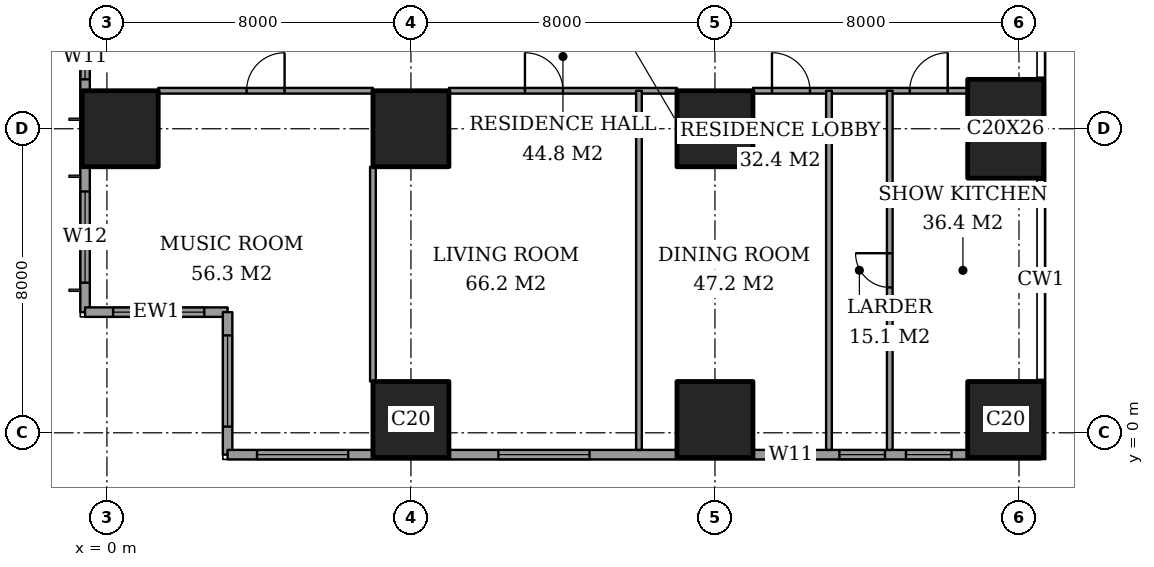
"""IFC4 building model, lengths in metres.
Left out: names, types, materials, properties, quantities, classifications, styles, units other than length and angle.
Written with IfcOpenShell. Run it as: python <this file> out.ifc"""

import sys

from ifc_helpers import new_model, si_unit, direction, frame, frame_2d, origin, origin_2d, place, context, subcontext, project, spatial, rectangle, extrude, element, fill, save


model = new_model("IFC4")
c1 = context("Model", 3, precision=1e-05, world=origin(), true_north=direction((0.0, 1.0)))
c2 = subcontext(c1, "Body", "Model", "MODEL_VIEW")
j1 = project(units=[si_unit("LENGTHUNIT", "METRE"), si_unit("PLANEANGLEUNIT", "RADIAN")], contexts=[c1])
p1 = place(None, origin())
s1 = spatial("IfcSite", under=j1, at=p1, CompositionType="ELEMENT")
p2 = place(p1, origin())
s2 = spatial("IfcBuilding", under=s1, at=p2, CompositionType="ELEMENT")
p3 = place(p2, frame((0.0, 0.0, 99.8)))
s3 = spatial("IfcBuildingStorey", under=s2, at=p3, CompositionType="ELEMENT", Elevation=99.8)
for number, where, z_axis, x_axis in (
    (1, (0.35, 8.0, 0.0), (0.0, 0.0, 1.0), (1.0, 0.0, 0.0)),
    (2, (8.0, 0.35, 0.0), (0.0, 0.0, 1.0), (1.0, 0.0, 0.0)),
    (3, (8.0, 8.0, 0.0), (0.0, 0.0, 1.0), (1.0, 0.0, 0.0)),
    (4, (16.0, 0.35, 0.0), (0.0, 0.0, 1.0), (1.0, 0.0, 0.0)),
    (5, (16.0, 8.0, 0.0), (0.0, 0.0, 1.0), (1.0, 0.0, 0.0)),
    (6, (23.65, 0.35, 0.0), (0.0, 0.0, 1.0), (1.0, 0.0, 0.0)),
):
    element("IfcColumn", number, at=place(p3, frame(where, z_axis=z_axis, x_axis=x_axis)), inside=s3, PredefinedType="COLUMN", context=c2, shape_type="SweptSolid", body=[
        extrude(rectangle(XDim=2.0, YDim=2.0, at=origin_2d()), origin(), (0.0, 0.0, 1.0), 3.6),
    ])
p4 = place(p3, frame((23.65, 8.0, 0.0), z_axis=(0.0, 0.0, 1.0), x_axis=(1.0, 0.0, 0.0)))
e7 = element("IfcColumn", 7, at=p4, inside=s3, PredefinedType="COLUMN", context=c2, shape_type="SweptSolid", body=[
    extrude(rectangle(XDim=2.0, YDim=2.6, at=origin_2d()), origin(), (0.0, 0.0, 1.0), 3.6),
])
p5 = place(p3, frame((-0.575, 44.825, 0.0), z_axis=(0.0, 0.0, 1.0), x_axis=(0.0, -1.0, 0.0)))
e8 = element("IfcWall", 8, at=p5, inside=s3, PredefinedType="SOLIDWALL", context=c2, shape_type="SweptSolid", body=[
    extrude(rectangle(XDim=41.65, YDim=0.25, at=frame_2d((20.825, 0.0))), origin(), (0.0, 0.0, 1.0), 3.6),
])
p6 = place(p5, frame((0.775, 0.0, 0.4)))
e9 = element("IfcOpeningElement", 9, at=p6, cuts=e8, PredefinedType="OPENING", context=c2, shape_type="SweptSolid", body=[
    extrude(rectangle(XDim=2.4, YDim=2.2, at=frame_2d((1.2, 1.1))), frame((0.0, 0.135, 0.0), z_axis=(0.0, -1.0, 0.0), x_axis=(1.0, 0.0, 0.0)), (0.0, 0.0, 1.0), 0.27),
])
p7 = place(p5, frame((6.1, 0.0, 0.4)))
e10 = element("IfcOpeningElement", 10, at=p7, cuts=e8, PredefinedType="OPENING", context=c2, shape_type="SweptSolid", body=[
    extrude(rectangle(XDim=1.2, YDim=2.2, at=frame_2d((0.6, 1.1))), frame((0.0, 0.135, 0.0), z_axis=(0.0, -1.0, 0.0), x_axis=(1.0, 0.0, 0.0)), (0.0, 0.0, 1.0), 0.27),
])
p8 = place(p5, frame((8.425, 0.0, 0.4)))
e11 = element("IfcOpeningElement", 11, at=p8, cuts=e8, PredefinedType="OPENING", context=c2, shape_type="SweptSolid", body=[
    extrude(rectangle(XDim=2.4, YDim=2.2, at=frame_2d((1.2, 1.1))), frame((0.0, 0.135, 0.0), z_axis=(0.0, -1.0, 0.0), x_axis=(1.0, 0.0, 0.0)), (0.0, 0.0, 1.0), 0.27),
])
p9 = place(p5, frame((15.625, 0.0, 0.4)))
e12 = element("IfcOpeningElement", 12, at=p9, cuts=e8, PredefinedType="OPENING", context=c2, shape_type="SweptSolid", body=[
    extrude(rectangle(XDim=2.4, YDim=2.2, at=frame_2d((1.2, 1.1))), frame((0.0, 0.135, 0.0), z_axis=(0.0, -1.0, 0.0), x_axis=(1.0, 0.0, 0.0)), (0.0, 0.0, 1.0), 0.27),
])
p10 = place(p5, frame((23.625, 0.0, 0.4)))
e13 = element("IfcOpeningElement", 13, at=p10, cuts=e8, PredefinedType="OPENING", context=c2, shape_type="SweptSolid", body=[
    extrude(rectangle(XDim=2.4, YDim=2.2, at=frame_2d((1.2, 1.1))), frame((0.0, 0.135, 0.0), z_axis=(0.0, -1.0, 0.0), x_axis=(1.0, 0.0, 0.0)), (0.0, 0.0, 1.0), 0.27),
])
p11 = place(p5, frame((30.725, 0.0, 0.4)))
e14 = element("IfcOpeningElement", 14, at=p11, cuts=e8, PredefinedType="OPENING", context=c2, shape_type="SweptSolid", body=[
    extrude(rectangle(XDim=2.4, YDim=2.2, at=frame_2d((1.2, 1.1))), frame((0.0, 0.135, 0.0), z_axis=(0.0, -1.0, 0.0), x_axis=(1.0, 0.0, 0.0)), (0.0, 0.0, 1.0), 0.27),
])
p12 = place(p5, frame((34.325, 0.0, 0.4)))
e15 = element("IfcOpeningElement", 15, at=p12, cuts=e8, PredefinedType="OPENING", context=c2, shape_type="SweptSolid", body=[
    extrude(rectangle(XDim=1.2, YDim=2.2, at=frame_2d((0.6, 1.1))), frame((0.0, 0.135, 0.0), z_axis=(0.0, -1.0, 0.0), x_axis=(1.0, 0.0, 0.0)), (0.0, 0.0, 1.0), 0.27),
])
p13 = place(p5, frame((38.475, 0.0, 0.4)))
e16 = element("IfcOpeningElement", 16, at=p13, cuts=e8, PredefinedType="OPENING", context=c2, shape_type="SweptSolid", body=[
    extrude(rectangle(XDim=2.4, YDim=2.2, at=frame_2d((1.2, 1.1))), frame((0.0, 0.135, 0.0), z_axis=(0.0, -1.0, 0.0), x_axis=(1.0, 0.0, 0.0)), (0.0, 0.0, 1.0), 0.27),
])
p14 = place(p3, frame((-0.575, 3.175, 0.0), z_axis=(0.0, 0.0, 1.0), x_axis=(1.0, 0.0, 0.0)))
e17 = element("IfcWall", 17, at=p14, inside=s3, PredefinedType="SOLIDWALL", context=c2, shape_type="SweptSolid", body=[
    extrude(rectangle(XDim=3.75, YDim=0.25, at=frame_2d((1.875, 0.0))), origin(), (0.0, 0.0, 1.0), 3.6),
])
p15 = place(p14, frame((0.738, 0.0, 0.4)))
e18 = element("IfcOpeningElement", 18, at=p15, cuts=e17, PredefinedType="OPENING", context=c2, shape_type="SweptSolid", body=[
    extrude(rectangle(XDim=2.4, YDim=2.2, at=frame_2d((1.2, 1.1))), frame((0.0, 0.135, 0.0), z_axis=(0.0, -1.0, 0.0), x_axis=(1.0, 0.0, 0.0)), (0.0, 0.0, 1.0), 0.27),
])
p16 = place(p3, frame((3.175, 3.175, 0.0), z_axis=(0.0, 0.0, 1.0), x_axis=(0.0, -1.0, 0.0)))
e19 = element("IfcWall", 19, at=p16, inside=s3, PredefinedType="SOLIDWALL", context=c2, shape_type="SweptSolid", body=[
    extrude(rectangle(XDim=3.75, YDim=0.25, at=frame_2d((1.875, 0.0))), origin(), (0.0, 0.0, 1.0), 3.6),
])
p17 = place(p16, frame((0.613, 0.0, 0.4)))
e20 = element("IfcOpeningElement", 20, at=p17, cuts=e19, PredefinedType="OPENING", context=c2, shape_type="SweptSolid", body=[
    extrude(rectangle(XDim=2.4, YDim=2.2, at=frame_2d((1.2, 1.1))), frame((0.0, 0.135, 0.0), z_axis=(0.0, -1.0, 0.0), x_axis=(1.0, 0.0, 0.0)), (0.0, 0.0, 1.0), 0.27),
])
p18 = place(p3, frame((3.175, -0.575, 0.0), z_axis=(0.0, 0.0, 1.0), x_axis=(1.0, 0.0, 0.0)))
e21 = element("IfcWall", 21, at=p18, inside=s3, PredefinedType="SOLIDWALL", context=c2, shape_type="SweptSolid", body=[
    extrude(rectangle(XDim=21.4, YDim=0.25, at=frame_2d((10.7, 0.0))), origin(), (0.0, 0.0, 1.0), 3.6),
])
p19 = place(p18, frame((0.775, 0.0, 0.4)))
e22 = element("IfcOpeningElement", 22, at=p19, cuts=e21, PredefinedType="OPENING", context=c2, shape_type="SweptSolid", body=[
    extrude(rectangle(XDim=2.4, YDim=2.2, at=frame_2d((1.2, 1.1))), frame((0.0, 0.135, 0.0), z_axis=(0.0, -1.0, 0.0), x_axis=(1.0, 0.0, 0.0)), (0.0, 0.0, 1.0), 0.27),
])
p20 = place(p18, frame((7.125, 0.0, 0.4)))
e23 = element("IfcOpeningElement", 23, at=p20, cuts=e21, PredefinedType="OPENING", context=c2, shape_type="SweptSolid", body=[
    extrude(rectangle(XDim=2.4, YDim=2.2, at=frame_2d((1.2, 1.1))), frame((0.0, 0.135, 0.0), z_axis=(0.0, -1.0, 0.0), x_axis=(1.0, 0.0, 0.0)), (0.0, 0.0, 1.0), 0.27),
])
p21 = place(p18, frame((14.225, 0.0, 0.4)))
e24 = element("IfcOpeningElement", 24, at=p21, cuts=e21, PredefinedType="OPENING", context=c2, shape_type="SweptSolid", body=[
    extrude(rectangle(XDim=1.2, YDim=2.2, at=frame_2d((0.6, 1.1))), frame((0.0, 0.135, 0.0), z_axis=(0.0, -1.0, 0.0), x_axis=(1.0, 0.0, 0.0)), (0.0, 0.0, 1.0), 0.27),
])
p22 = place(p18, frame((16.1, 0.0, 0.4)))
e25 = element("IfcOpeningElement", 25, at=p22, cuts=e21, PredefinedType="OPENING", context=c2, shape_type="SweptSolid", body=[
    extrude(rectangle(XDim=1.2, YDim=2.2, at=frame_2d((0.6, 1.1))), frame((0.0, 0.135, 0.0), z_axis=(0.0, -1.0, 0.0), x_axis=(1.0, 0.0, 0.0)), (0.0, 0.0, 1.0), 0.27),
])
p23 = place(p18, frame((17.85, 0.0, 0.4)))
e26 = element("IfcOpeningElement", 26, at=p23, cuts=e21, PredefinedType="OPENING", context=c2, shape_type="SweptSolid", body=[
    extrude(rectangle(XDim=1.2, YDim=2.2, at=frame_2d((0.6, 1.1))), frame((0.0, 0.135, 0.0), z_axis=(0.0, -1.0, 0.0), x_axis=(1.0, 0.0, 0.0)), (0.0, 0.0, 1.0), 0.27),
])
p24 = place(p3, frame((1.35, 9.0, 0.0), z_axis=(0.0, 0.0, 1.0), x_axis=(1.0, 0.0, 0.0)))
e27 = element("IfcWall", 27, at=p24, inside=s3, PredefinedType="PARTITIONING", context=c2, shape_type="SweptSolid", body=[
    extrude(rectangle(XDim=5.65, YDim=0.15, at=frame_2d((2.825, 0.0))), origin(), (0.0, 0.0, 1.0), 3.35),
])
p25 = place(p24, frame((2.325, 0.0, 0.0)))
e28 = element("IfcOpeningElement", 28, at=p25, cuts=e27, PredefinedType="OPENING", context=c2, shape_type="SweptSolid", body=[
    extrude(rectangle(XDim=1.0, YDim=2.1, at=frame_2d((0.5, 1.05))), frame((0.0, 0.085, 0.0), z_axis=(0.0, -1.0, 0.0), x_axis=(1.0, 0.0, 0.0)), (0.0, 0.0, 1.0), 0.17),
])
p26 = place(p3, frame((9.0, 9.0, 0.0), z_axis=(0.0, 0.0, 1.0), x_axis=(1.0, 0.0, 0.0)))
e29 = element("IfcWall", 29, at=p26, inside=s3, PredefinedType="PARTITIONING", context=c2, shape_type="SweptSolid", body=[
    extrude(rectangle(XDim=6.0, YDim=0.15, at=frame_2d((3.0, 0.0))), origin(), (0.0, 0.0, 1.0), 3.35),
])
p27 = place(p26, frame((2.0, 0.0, 0.0)))
e30 = element("IfcOpeningElement", 30, at=p27, cuts=e29, PredefinedType="OPENING", context=c2, shape_type="SweptSolid", body=[
    extrude(rectangle(XDim=1.0, YDim=2.1, at=frame_2d((0.5, 1.05))), frame((0.0, 0.085, 0.0), z_axis=(0.0, -1.0, 0.0), x_axis=(1.0, 0.0, 0.0)), (0.0, 0.0, 1.0), 0.17),
])
p28 = place(p3, frame((17.0, 9.0, 0.0), z_axis=(0.0, 0.0, 1.0), x_axis=(1.0, 0.0, 0.0)))
e31 = element("IfcWall", 31, at=p28, inside=s3, PredefinedType="PARTITIONING", context=c2, shape_type="SweptSolid", body=[
    extrude(rectangle(XDim=5.65, YDim=0.15, at=frame_2d((2.825, 0.0))), origin(), (0.0, 0.0, 1.0), 3.35),
])
p29 = place(p28, frame((0.5, 0.0, 0.0)))
e32 = element("IfcOpeningElement", 32, at=p29, cuts=e31, PredefinedType="OPENING", context=c2, shape_type="SweptSolid", body=[
    extrude(rectangle(XDim=1.0, YDim=2.1, at=frame_2d((0.5, 1.05))), frame((0.0, 0.085, 0.0), z_axis=(0.0, -1.0, 0.0), x_axis=(1.0, 0.0, 0.0)), (0.0, 0.0, 1.0), 0.17),
])
p30 = place(p28, frame((4.125, 0.0, 0.0)))
e33 = element("IfcOpeningElement", 33, at=p30, cuts=e31, PredefinedType="OPENING", context=c2, shape_type="SweptSolid", body=[
    extrude(rectangle(XDim=1.0, YDim=2.1, at=frame_2d((0.5, 1.05))), frame((0.0, 0.085, 0.0), z_axis=(0.0, -1.0, 0.0), x_axis=(1.0, 0.0, 0.0)), (0.0, 0.0, 1.0), 0.17),
])
p31 = place(p3, frame((7.0, 1.35, 0.0), z_axis=(0.0, 0.0, 1.0), x_axis=(0.0, 1.0, 0.0)))
e34 = element("IfcWall", 34, at=p31, inside=s3, PredefinedType="PARTITIONING", context=c2, shape_type="SweptSolid", body=[
    extrude(rectangle(XDim=5.65, YDim=0.15, at=frame_2d((2.825, 0.0))), origin(), (0.0, 0.0, 1.0), 3.35),
])
for number, where, z_axis, x_axis in (
    (35, (14.0, -0.45, 0.0), (0.0, 0.0, 1.0), (0.0, 1.0, 0.0)),
    (36, (19.0, -0.45, 0.0), (0.0, 0.0, 1.0), (0.0, 1.0, 0.0)),
):
    element("IfcWall", number, at=place(p3, frame(where, z_axis=z_axis, x_axis=x_axis)), inside=s3, PredefinedType="PARTITIONING", context=c2, shape_type="SweptSolid", body=[
        extrude(rectangle(XDim=9.45, YDim=0.15, at=frame_2d((4.725, 0.0))), origin(), (0.0, 0.0, 1.0), 3.35),
    ])
p32 = place(p3, frame((20.6, -0.45, 0.0), z_axis=(0.0, 0.0, 1.0), x_axis=(0.0, 1.0, 0.0)))
e37 = element("IfcWall", 37, at=p32, inside=s3, PredefinedType="PARTITIONING", context=c2, shape_type="SweptSolid", body=[
    extrude(rectangle(XDim=9.45, YDim=0.15, at=frame_2d((4.725, 0.0))), origin(), (0.0, 0.0, 1.0), 3.35),
])
p33 = place(p32, frame((4.275, 0.0, 0.0)))
e38 = element("IfcOpeningElement", 38, at=p33, cuts=e37, PredefinedType="OPENING", context=c2, shape_type="SweptSolid", body=[
    extrude(rectangle(XDim=0.9, YDim=2.1, at=frame_2d((0.45, 1.05))), frame((0.0, 0.085, 0.0), z_axis=(0.0, -1.0, 0.0), x_axis=(1.0, 0.0, 0.0)), (0.0, 0.0, 1.0), 0.17),
])
p34 = place(p12, origin())
e39 = element("IfcWindow", 39, at=p34, inside=s3, PartitioningType="SINGLE_PANEL", PredefinedType="WINDOW", context=c2, shape_type="SweptSolid", body=[
    extrude(rectangle(XDim=1.2, YDim=2.2, at=frame_2d((0.6, 1.1))), frame((0.0, 0.03, 0.0), z_axis=(0.0, -1.0, 0.0), x_axis=(1.0, 0.0, 0.0)), (0.0, 0.0, 1.0), 0.06),
])
fill(e15, e39)
p35 = place(p13, origin())
e40 = element("IfcWindow", 40, at=p35, inside=s3, PartitioningType="SINGLE_PANEL", PredefinedType="WINDOW", context=c2, shape_type="SweptSolid", body=[
    extrude(rectangle(XDim=2.4, YDim=2.2, at=frame_2d((1.2, 1.1))), frame((0.0, 0.03, 0.0), z_axis=(0.0, -1.0, 0.0), x_axis=(1.0, 0.0, 0.0)), (0.0, 0.0, 1.0), 0.06),
])
fill(e16, e40)
p36 = place(p15, origin())
e41 = element("IfcWindow", 41, at=p36, inside=s3, PartitioningType="SINGLE_PANEL", PredefinedType="WINDOW", context=c2, shape_type="SweptSolid", body=[
    extrude(rectangle(XDim=2.4, YDim=2.2, at=frame_2d((1.2, 1.1))), frame((0.0, 0.03, 0.0), z_axis=(0.0, -1.0, 0.0), x_axis=(1.0, 0.0, 0.0)), (0.0, 0.0, 1.0), 0.06),
])
fill(e18, e41)
p37 = place(p17, origin())
e42 = element("IfcWindow", 42, at=p37, inside=s3, PartitioningType="SINGLE_PANEL", PredefinedType="WINDOW", context=c2, shape_type="SweptSolid", body=[
    extrude(rectangle(XDim=2.4, YDim=2.2, at=frame_2d((1.2, 1.1))), frame((0.0, 0.03, 0.0), z_axis=(0.0, -1.0, 0.0), x_axis=(1.0, 0.0, 0.0)), (0.0, 0.0, 1.0), 0.06),
])
fill(e20, e42)
p38 = place(p19, origin())
e43 = element("IfcWindow", 43, at=p38, inside=s3, PartitioningType="SINGLE_PANEL", PredefinedType="WINDOW", context=c2, shape_type="SweptSolid", body=[
    extrude(rectangle(XDim=2.4, YDim=2.2, at=frame_2d((1.2, 1.1))), frame((0.0, 0.03, 0.0), z_axis=(0.0, -1.0, 0.0), x_axis=(1.0, 0.0, 0.0)), (0.0, 0.0, 1.0), 0.06),
])
fill(e22, e43)
p39 = place(p20, origin())
e44 = element("IfcWindow", 44, at=p39, inside=s3, PartitioningType="SINGLE_PANEL", PredefinedType="WINDOW", context=c2, shape_type="SweptSolid", body=[
    extrude(rectangle(XDim=2.4, YDim=2.2, at=frame_2d((1.2, 1.1))), frame((0.0, 0.03, 0.0), z_axis=(0.0, -1.0, 0.0), x_axis=(1.0, 0.0, 0.0)), (0.0, 0.0, 1.0), 0.06),
])
fill(e23, e44)
p40 = place(p21, origin())
e45 = element("IfcWindow", 45, at=p40, inside=s3, PartitioningType="SINGLE_PANEL", PredefinedType="WINDOW", context=c2, shape_type="SweptSolid", body=[
    extrude(rectangle(XDim=1.2, YDim=2.2, at=frame_2d((0.6, 1.1))), frame((0.0, 0.03, 0.0), z_axis=(0.0, -1.0, 0.0), x_axis=(1.0, 0.0, 0.0)), (0.0, 0.0, 1.0), 0.06),
])
fill(e24, e45)
p41 = place(p22, origin())
e46 = element("IfcWindow", 46, at=p41, inside=s3, PartitioningType="SINGLE_PANEL", PredefinedType="WINDOW", context=c2, shape_type="SweptSolid", body=[
    extrude(rectangle(XDim=1.2, YDim=2.2, at=frame_2d((0.6, 1.1))), frame((0.0, 0.03, 0.0), z_axis=(0.0, -1.0, 0.0), x_axis=(1.0, 0.0, 0.0)), (0.0, 0.0, 1.0), 0.06),
])
fill(e25, e46)
p42 = place(p23, origin())
e47 = element("IfcWindow", 47, at=p42, inside=s3, PartitioningType="SINGLE_PANEL", PredefinedType="WINDOW", context=c2, shape_type="SweptSolid", body=[
    extrude(rectangle(XDim=1.2, YDim=2.2, at=frame_2d((0.6, 1.1))), frame((0.0, 0.03, 0.0), z_axis=(0.0, -1.0, 0.0), x_axis=(1.0, 0.0, 0.0)), (0.0, 0.0, 1.0), 0.06),
])
fill(e26, e47)
p43 = place(p25, origin())
e48 = element("IfcDoor", 48, at=p43, inside=s3, OperationType="SINGLE_SWING_LEFT", PredefinedType="DOOR", context=c2, shape_type="SweptSolid", body=[
    extrude(rectangle(XDim=1.0, YDim=2.1, at=frame_2d((0.5, 1.05))), frame((0.0, 0.025, 0.0), z_axis=(0.0, -1.0, 0.0), x_axis=(1.0, 0.0, 0.0)), (0.0, 0.0, 1.0), 0.05),
])
fill(e28, e48)
p44 = place(p27, origin())
e49 = element("IfcDoor", 49, at=p44, inside=s3, OperationType="SINGLE_SWING_RIGHT", PredefinedType="DOOR", context=c2, shape_type="SweptSolid", body=[
    extrude(rectangle(XDim=1.0, YDim=2.1, at=frame_2d((0.5, 1.05))), frame((0.0, 0.025, 0.0), z_axis=(0.0, -1.0, 0.0), x_axis=(1.0, 0.0, 0.0)), (0.0, 0.0, 1.0), 0.05),
])
fill(e30, e49)
p45 = place(p29, origin())
e50 = element("IfcDoor", 50, at=p45, inside=s3, OperationType="SINGLE_SWING_RIGHT", PredefinedType="DOOR", context=c2, shape_type="SweptSolid", body=[
    extrude(rectangle(XDim=1.0, YDim=2.1, at=frame_2d((0.5, 1.05))), frame((0.0, 0.025, 0.0), z_axis=(0.0, -1.0, 0.0), x_axis=(1.0, 0.0, 0.0)), (0.0, 0.0, 1.0), 0.05),
])
fill(e32, e50)
p46 = place(p33, origin())
e51 = element("IfcDoor", 51, at=p46, inside=s3, OperationType="SINGLE_SWING_LEFT", PredefinedType="DOOR", context=c2, shape_type="SweptSolid", body=[
    extrude(rectangle(XDim=0.9, YDim=2.1, at=frame_2d((0.45, 1.05))), frame((0.0, 0.025, 0.0), z_axis=(0.0, -1.0, 0.0), x_axis=(1.0, 0.0, 0.0)), (0.0, 0.0, 1.0), 0.05),
])
fill(e38, e51)
p47 = place(p30, origin())
e52 = element("IfcDoor", 52, at=p47, inside=s3, OperationType="SINGLE_SWING_LEFT", PredefinedType="DOOR", context=c2, shape_type="SweptSolid", body=[
    extrude(rectangle(XDim=1.0, YDim=2.1, at=frame_2d((0.5, 1.05))), frame((0.0, 0.025, 0.0), z_axis=(0.0, -1.0, 0.0), x_axis=(1.0, 0.0, 0.0)), (0.0, 0.0, 1.0), 0.05),
])
fill(e33, e52)
save(model, sys.argv[1])
